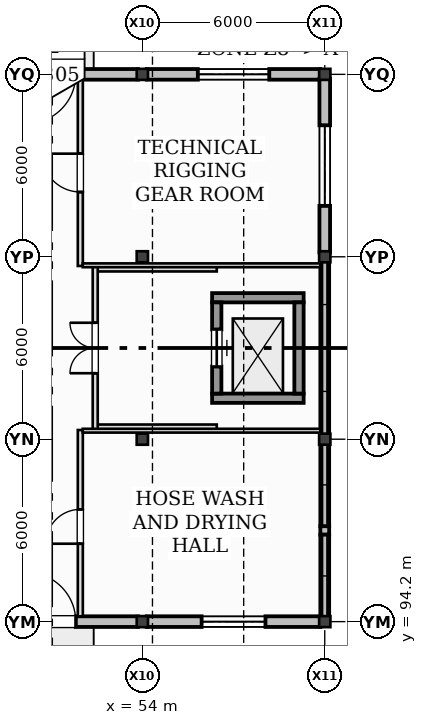
"""IFC4 building model, lengths in metres.
Left out: names, types, materials, properties, quantities, classifications, styles, units other than length and angle.
Written with IfcOpenShell. Run it as: python <this file> out.ifc"""

import sys

from ifc_helpers import new_model, si_unit, direction, frame, frame_2d, origin, origin_2d, place, context, subcontext, project, spatial, rectangle, i_section, extrude, element, fill, save


model = new_model("IFC4")
c1 = context("Model", 3, precision=1e-05, world=origin(), true_north=direction((0.0, 1.0)))
c2 = subcontext(c1, "Body", "Model", "MODEL_VIEW")
j1 = project(units=[si_unit("LENGTHUNIT", "METRE"), si_unit("PLANEANGLEUNIT", "RADIAN")], contexts=[c1])
p1 = place(None, origin())
s1 = spatial("IfcSite", under=j1, at=p1, CompositionType="ELEMENT")
p2 = place(p1, origin())
s2 = spatial("IfcBuilding", under=s1, at=p2, CompositionType="ELEMENT")
p3 = place(p2, origin())
s3 = spatial("IfcBuildingStorey", under=s2, at=p3, CompositionType="ELEMENT", Elevation=0.0)
for number, where, z_axis, x_axis in (
    (1, (54.0, 94.2, -0.41), (0.0, 0.0, 1.0), (1.0, 0.0, 0.0)),
    (2, (54.0, 100.2, -0.41), (0.0, 0.0, 1.0), (1.0, 0.0, 0.0)),
    (3, (54.0, 106.2, -0.41), (0.0, 0.0, 1.0), (1.0, 0.0, 0.0)),
    (4, (54.0, 112.2, -0.41), (0.0, 0.0, 1.0), (1.0, 0.0, 0.0)),
    (5, (60.0, 94.2, -0.41), (0.0, 0.0, 1.0), (1.0, 0.0, 0.0)),
    (6, (60.0, 100.2, -0.41), (0.0, 0.0, 1.0), (1.0, 0.0, 0.0)),
    (7, (60.0, 106.2, -0.41), (0.0, 0.0, 1.0), (1.0, 0.0, 0.0)),
    (8, (60.0, 112.2, -0.41), (0.0, 0.0, 1.0), (1.0, 0.0, 0.0)),
):
    element("IfcColumn", number, at=place(p3, frame(where, z_axis=z_axis, x_axis=x_axis)), inside=s3, PredefinedType="COLUMN", context=c2, shape_type="SweptSolid", body=[
        extrude(i_section(OverallWidth=0.371, OverallDepth=0.364, WebThickness=0.013, FlangeThickness=0.022, at=origin_2d()), origin(), (0.0, 0.0, 1.0), 6.41),
    ])
p4 = place(p3, frame((48.145, 94.2, 0.0), z_axis=(0.0, 0.0, 1.0), x_axis=(1.0, 0.0, 0.0)))
e9 = element("IfcWall", 9, at=p4, inside=s3, PredefinedType="STANDARD", context=c2, shape_type="SweptSolid", body=[
    extrude(rectangle(XDim=5.71, YDim=0.35, at=frame_2d((2.855, 0.0))), origin(), (0.0, 0.0, 1.0), 5.113),
])
p5 = place(p4, frame((2.045, 0.0, 0.0)))
e10 = element("IfcOpeningElement", 10, at=p5, cuts=e9, PredefinedType="OPENING", context=c2, shape_type="SweptSolid", body=[
    extrude(rectangle(XDim=1.62, YDim=2.2, at=frame_2d((0.81, 1.1))), frame((0.0, 0.185, 0.0), z_axis=(0.0, -1.0, 0.0), x_axis=(1.0, 0.0, 0.0)), (0.0, 0.0, 1.0), 0.37),
])
p6 = place(p3, frame((54.145, 94.2, 0.0), z_axis=(0.0, 0.0, 1.0), x_axis=(1.0, 0.0, 0.0)))
e11 = element("IfcWall", 11, at=p6, inside=s3, PredefinedType="STANDARD", context=c2, shape_type="SweptSolid", body=[
    extrude(rectangle(XDim=5.71, YDim=0.35, at=frame_2d((2.855, 0.0))), origin(), (0.0, 0.0, 1.0), 5.113),
])
p7 = place(p6, frame((1.805, 0.0, 1.0)))
e12 = element("IfcOpeningElement", 12, at=p7, cuts=e11, PredefinedType="OPENING", context=c2, shape_type="SweptSolid", body=[
    extrude(rectangle(XDim=2.1, YDim=1.55, at=frame_2d((1.05, 0.775))), frame((0.0, 0.185, 0.0), z_axis=(0.0, -1.0, 0.0), x_axis=(1.0, 0.0, 0.0)), (0.0, 0.0, 1.0), 0.37),
])
p8 = place(p3, frame((53.855, 112.2, 0.0), z_axis=(0.0, 0.0, 1.0), x_axis=(-1.0, 0.0, 0.0)))
e13 = element("IfcWall", 13, at=p8, inside=s3, PredefinedType="STANDARD", context=c2, shape_type="SweptSolid", body=[
    extrude(rectangle(XDim=5.71, YDim=0.35, at=frame_2d((2.855, 0.0))), origin(), (0.0, 0.0, 1.0), 5.113),
])
p9 = place(p8, frame((2.045, 0.0, 0.0)))
e14 = element("IfcOpeningElement", 14, at=p9, cuts=e13, PredefinedType="OPENING", context=c2, shape_type="SweptSolid", body=[
    extrude(rectangle(XDim=1.62, YDim=2.2, at=frame_2d((0.81, 1.1))), frame((0.0, 0.185, 0.0), z_axis=(0.0, -1.0, 0.0), x_axis=(1.0, 0.0, 0.0)), (0.0, 0.0, 1.0), 0.37),
])
p10 = place(p3, frame((59.855, 112.2, 0.0), z_axis=(0.0, 0.0, 1.0), x_axis=(-1.0, 0.0, 0.0)))
e15 = element("IfcWall", 15, at=p10, inside=s3, PredefinedType="STANDARD", context=c2, shape_type="SweptSolid", body=[
    extrude(rectangle(XDim=5.71, YDim=0.35, at=frame_2d((2.855, 0.0))), origin(), (0.0, 0.0, 1.0), 5.113),
])
p11 = place(p10, frame((1.68, 0.0, 1.0)))
e16 = element("IfcOpeningElement", 16, at=p11, cuts=e15, PredefinedType="OPENING", context=c2, shape_type="SweptSolid", body=[
    extrude(rectangle(XDim=2.35, YDim=1.55, at=frame_2d((1.175, 0.775))), frame((0.0, 0.185, 0.0), z_axis=(0.0, -1.0, 0.0), x_axis=(1.0, 0.0, 0.0)), (0.0, 0.0, 1.0), 0.37),
])
p12 = place(p3, frame((60.0, 97.06, 0.0), z_axis=(0.0, 0.0, 1.0), x_axis=(0.0, 1.0, 0.0)))
e17 = element("IfcWall", 17, at=p12, inside=s3, PredefinedType="STANDARD", context=c2, shape_type="SweptSolid", body=[
    extrude(rectangle(XDim=0.28, YDim=0.29, at=frame_2d((0.14, 0.0))), origin(), (0.0, 0.0, 1.0), 5.044),
])
p13 = place(p3, frame((60.0, 94.345, 0.0), z_axis=(0.0, 0.0, 1.0), x_axis=(0.0, 1.0, 0.0)))
e18 = element("IfcWall", 18, at=p13, inside=s3, PredefinedType="STANDARD", context=c2, shape_type="SweptSolid", body=[
    extrude(rectangle(XDim=2.715, YDim=0.29, at=frame_2d((1.357, 0.0))), origin(), (0.0, 0.0, 1.0), 0.44),
])
p14 = place(p3, frame((60.0, 97.34, 0.0), z_axis=(0.0, 0.0, 1.0), x_axis=(0.0, 1.0, 0.0)))
e19 = element("IfcWall", 19, at=p14, inside=s3, PredefinedType="STANDARD", context=c2, shape_type="SweptSolid", body=[
    extrude(rectangle(XDim=2.715, YDim=0.29, at=frame_2d((1.357, 0.0))), origin(), (0.0, 0.0, 1.0), 0.56),
])
p15 = place(p3, frame((60.0, 100.345, 0.0), z_axis=(0.0, 0.0, 1.0), x_axis=(0.0, 1.0, 0.0)))
e20 = element("IfcWall", 20, at=p15, inside=s3, PredefinedType="STANDARD", context=c2, shape_type="SweptSolid", body=[
    extrude(rectangle(XDim=5.71, YDim=0.29, at=frame_2d((2.855, 0.0))), origin(), (0.0, 0.0, 1.0), 0.68),
])
p16 = place(p3, frame((60.0, 106.345, 0.0), z_axis=(0.0, 0.0, 1.0), x_axis=(0.0, 1.0, 0.0)))
e21 = element("IfcWall", 21, at=p16, inside=s3, PredefinedType="STANDARD", context=c2, shape_type="SweptSolid", body=[
    extrude(rectangle(XDim=5.71, YDim=0.35, at=frame_2d((2.855, 0.0))), origin(), (0.0, 0.0, 1.0), 5.044),
])
p17 = place(p16, frame((1.53, 0.0, 1.0)))
e22 = element("IfcOpeningElement", 22, at=p17, cuts=e21, PredefinedType="OPENING", context=c2, shape_type="SweptSolid", body=[
    extrude(rectangle(XDim=2.65, YDim=1.55, at=frame_2d((1.325, 0.775))), frame((0.0, 0.185, 0.0), z_axis=(0.0, -1.0, 0.0), x_axis=(1.0, 0.0, 0.0)), (0.0, 0.0, 1.0), 0.37),
])
for number, where, z_axis, x_axis in (
    (23, (56.295, 101.548, 0.0), (0.0, 0.0, 1.0), (1.0, 0.0, 0.0)),
    (24, (59.305, 104.853, 0.0), (0.0, 0.0, 1.0), (-1.0, 0.0, 0.0)),
):
    element("IfcWall", number, at=place(p3, frame(where, z_axis=z_axis, x_axis=x_axis)), inside=s3, PredefinedType="SHEAR", context=c2, shape_type="SweptSolid", body=[
        extrude(rectangle(XDim=3.01, YDim=0.305, at=frame_2d((1.505, 0.0))), origin(), (0.0, 0.0, 1.0), 6.0),
    ])
p18 = place(p3, frame((56.448, 104.7, 0.0), z_axis=(0.0, 0.0, 1.0), x_axis=(0.0, -1.0, 0.0)))
e25 = element("IfcWall", 25, at=p18, inside=s3, PredefinedType="SHEAR", context=c2, shape_type="SweptSolid", body=[
    extrude(rectangle(XDim=3.0, YDim=0.305, at=frame_2d((1.5, 0.0))), origin(), (0.0, 0.0, 1.0), 6.0),
])
p19 = place(p18, frame((0.89, 0.0, 0.0)))
e26 = element("IfcOpeningElement", 26, at=p19, cuts=e25, PredefinedType="OPENING", context=c2, shape_type="SweptSolid", body=[
    extrude(rectangle(XDim=1.22, YDim=2.22, at=frame_2d((0.61, 1.11))), frame((0.0, 0.162, 0.0), z_axis=(0.0, -1.0, 0.0), x_axis=(1.0, 0.0, 0.0)), (0.0, 0.0, 1.0), 0.325),
])
p20 = place(p3, frame((59.153, 101.7, 0.0), z_axis=(0.0, 0.0, 1.0), x_axis=(0.0, 1.0, 0.0)))
e27 = element("IfcWall", 27, at=p20, inside=s3, PredefinedType="SHEAR", context=c2, shape_type="SweptSolid", body=[
    extrude(rectangle(XDim=3.0, YDim=0.305, at=frame_2d((1.5, 0.0))), origin(), (0.0, 0.0, 1.0), 6.0),
])
for number, where, z_axis, x_axis in (
    (28, (52.45, 100.6, 0.0), (0.0, 0.0, 1.0), (1.0, 0.0, 0.0)),
    (29, (56.448, 105.8, 0.0), (0.0, 0.0, 1.0), (-1.0, 0.0, 0.0)),
):
    element("IfcWall", number, at=place(p3, frame(where, z_axis=z_axis, x_axis=x_axis)), inside=s3, PredefinedType="PARTITIONING", context=c2, shape_type="SweptSolid", body=[
        extrude(rectangle(XDim=3.998, YDim=0.165, at=frame_2d((1.999, 0.0))), origin(), (0.0, 0.0, 1.0), 5.68),
    ])
p21 = place(p3, frame((52.45, 100.52, 0.0), z_axis=(0.0, 0.0, 1.0), x_axis=(0.0, 1.0, 0.0)))
e30 = element("IfcWall", 30, at=p21, inside=s3, PredefinedType="PARTITIONING", context=c2, shape_type="SweptSolid", body=[
    extrude(rectangle(XDim=5.36, YDim=0.165, at=frame_2d((2.68, 0.0))), origin(), (0.0, 0.0, 1.0), 5.68),
])
p22 = place(p21, frame((1.85, 0.0, 0.0)))
e31 = element("IfcOpeningElement", 31, at=p22, cuts=e30, PredefinedType="OPENING", context=c2, shape_type="SweptSolid", body=[
    extrude(rectangle(XDim=1.66, YDim=2.2, at=frame_2d((0.83, 1.1))), frame((0.0, 0.093, 0.0), z_axis=(0.0, -1.0, 0.0), x_axis=(1.0, 0.0, 0.0)), (0.0, 0.0, 1.0), 0.185),
])
p23 = place(p3, frame((51.96, 94.375, 0.0), z_axis=(0.0, 0.0, 1.0), x_axis=(0.0, 1.0, 0.0)))
e32 = element("IfcWall", 32, at=p23, inside=s3, PredefinedType="PARTITIONING", context=c2, shape_type="SweptSolid", body=[
    extrude(rectangle(XDim=6.127, YDim=0.165, at=frame_2d((3.064, 0.0))), origin(), (0.0, 0.0, 1.0), 5.249),
])
p24 = place(p23, frame((2.387, 0.0, 0.0)))
e33 = element("IfcOpeningElement", 33, at=p24, cuts=e32, PredefinedType="OPENING", context=c2, shape_type="SweptSolid", body=[
    extrude(rectangle(XDim=1.13, YDim=2.18, at=frame_2d((0.565, 1.09))), frame((0.0, 0.093, 0.0), z_axis=(0.0, -1.0, 0.0), x_axis=(1.0, 0.0, 0.0)), (0.0, 0.0, 1.0), 0.185),
])
p25 = place(p3, frame((52.04, 100.48, 0.0), z_axis=(0.0, 0.0, 1.0), x_axis=(1.0, 0.0, 0.0)))
e34 = element("IfcWall", 34, at=p25, inside=s3, PredefinedType="PARTITIONING", context=c2, shape_type="SweptSolid", body=[
    extrude(rectangle(XDim=7.815, YDim=0.125, at=frame_2d((3.907, 0.0))), origin(), (0.0, 0.0, 1.0), 5.113),
])
p26 = place(p3, frame((51.96, 105.897, 0.0), z_axis=(0.0, 0.0, 1.0), x_axis=(0.0, 1.0, 0.0)))
e35 = element("IfcWall", 35, at=p26, inside=s3, PredefinedType="PARTITIONING", context=c2, shape_type="SweptSolid", body=[
    extrude(rectangle(XDim=6.127, YDim=0.165, at=frame_2d((3.064, 0.0))), origin(), (0.0, 0.0, 1.0), 5.249),
])
p27 = place(p26, frame((2.434, 0.0, 0.0)))
e36 = element("IfcOpeningElement", 36, at=p27, cuts=e35, PredefinedType="OPENING", context=c2, shape_type="SweptSolid", body=[
    extrude(rectangle(XDim=1.26, YDim=2.2, at=frame_2d((0.63, 1.1))), frame((0.0, 0.093, 0.0), z_axis=(0.0, -1.0, 0.0), x_axis=(1.0, 0.0, 0.0)), (0.0, 0.0, 1.0), 0.185),
])
p28 = place(p3, frame((59.855, 105.92, 0.0), z_axis=(0.0, 0.0, 1.0), x_axis=(-1.0, 0.0, 0.0)))
e37 = element("IfcWall", 37, at=p28, inside=s3, PredefinedType="PARTITIONING", context=c2, shape_type="SweptSolid", body=[
    extrude(rectangle(XDim=7.815, YDim=0.125, at=frame_2d((3.907, 0.0))), origin(), (0.0, 0.0, 1.0), 5.113),
])
p29 = place(p5, frame((1.62, 0.0, 0.0), z_axis=(0.0, 0.0, 1.0), x_axis=(-1.0, 0.0, 0.0)))
e38 = element("IfcDoor", 38, at=p29, inside=s3, OperationType="SINGLE_SWING_LEFT", PredefinedType="DOOR", context=c2, shape_type="SweptSolid", body=[
    extrude(rectangle(XDim=1.62, YDim=2.2, at=frame_2d((0.81, 1.1))), frame((0.0, 0.025, 0.0), z_axis=(0.0, -1.0, 0.0), x_axis=(1.0, 0.0, 0.0)), (0.0, 0.0, 1.0), 0.05),
])
fill(e10, e38)
p30 = place(p7, origin())
e39 = element("IfcWindow", 39, at=p30, inside=s3, PartitioningType="SINGLE_PANEL", PredefinedType="WINDOW", context=c2, shape_type="SweptSolid", body=[
    extrude(rectangle(XDim=2.1, YDim=1.55, at=frame_2d((1.05, 0.775))), frame((0.0, 0.03, 0.0), z_axis=(0.0, -1.0, 0.0), x_axis=(1.0, 0.0, 0.0)), (0.0, 0.0, 1.0), 0.06),
])
fill(e12, e39)
p31 = place(p9, frame((1.62, 0.0, 0.0), z_axis=(0.0, 0.0, 1.0), x_axis=(-1.0, 0.0, 0.0)))
e40 = element("IfcDoor", 40, at=p31, inside=s3, OperationType="SINGLE_SWING_RIGHT", PredefinedType="DOOR", context=c2, shape_type="SweptSolid", body=[
    extrude(rectangle(XDim=1.62, YDim=2.2, at=frame_2d((0.81, 1.1))), frame((0.0, 0.025, 0.0), z_axis=(0.0, -1.0, 0.0), x_axis=(1.0, 0.0, 0.0)), (0.0, 0.0, 1.0), 0.05),
])
fill(e14, e40)
p32 = place(p11, origin())
e41 = element("IfcWindow", 41, at=p32, inside=s3, PartitioningType="SINGLE_PANEL", PredefinedType="WINDOW", context=c2, shape_type="SweptSolid", body=[
    extrude(rectangle(XDim=2.35, YDim=1.55, at=frame_2d((1.175, 0.775))), frame((0.0, 0.03, 0.0), z_axis=(0.0, -1.0, 0.0), x_axis=(1.0, 0.0, 0.0)), (0.0, 0.0, 1.0), 0.06),
])
fill(e16, e41)
p33 = place(p17, origin())
e42 = element("IfcWindow", 42, at=p33, inside=s3, PartitioningType="SINGLE_PANEL", PredefinedType="WINDOW", context=c2, shape_type="SweptSolid", body=[
    extrude(rectangle(XDim=2.65, YDim=1.55, at=frame_2d((1.325, 0.775))), frame((0.0, 0.03, 0.0), z_axis=(0.0, -1.0, 0.0), x_axis=(1.0, 0.0, 0.0)), (0.0, 0.0, 1.0), 0.06),
])
fill(e22, e42)
p34 = place(p19, origin())
e43 = element("IfcDoor", 43, at=p34, inside=s3, OperationType="SLIDING_TO_LEFT", PredefinedType="DOOR", context=c2, shape_type="SweptSolid", body=[
    extrude(rectangle(XDim=1.22, YDim=2.22, at=frame_2d((0.61, 1.11))), frame((0.0, 0.025, 0.0), z_axis=(0.0, -1.0, 0.0), x_axis=(1.0, 0.0, 0.0)), (0.0, 0.0, 1.0), 0.05),
])
fill(e26, e43)
p35 = place(p22, frame((1.66, 0.0, 0.0), z_axis=(0.0, 0.0, 1.0), x_axis=(-1.0, 0.0, 0.0)))
e44 = element("IfcDoor", 44, at=p35, inside=s3, OperationType="DOUBLE_DOOR_SINGLE_SWING", PredefinedType="DOOR", context=c2, shape_type="SweptSolid", body=[
    extrude(rectangle(XDim=1.66, YDim=2.2, at=frame_2d((0.83, 1.1))), frame((0.0, 0.025, 0.0), z_axis=(0.0, -1.0, 0.0), x_axis=(1.0, 0.0, 0.0)), (0.0, 0.0, 1.0), 0.05),
])
fill(e31, e44)
p36 = place(p24, frame((1.13, 0.0, 0.0), z_axis=(0.0, 0.0, 1.0), x_axis=(-1.0, 0.0, 0.0)))
e45 = element("IfcDoor", 45, at=p36, inside=s3, OperationType="SINGLE_SWING_LEFT", PredefinedType="DOOR", context=c2, shape_type="SweptSolid", body=[
    extrude(rectangle(XDim=1.13, YDim=2.18, at=frame_2d((0.565, 1.09))), frame((0.0, 0.025, 0.0), z_axis=(0.0, -1.0, 0.0), x_axis=(1.0, 0.0, 0.0)), (0.0, 0.0, 1.0), 0.05),
])
fill(e33, e45)
p37 = place(p27, frame((1.26, 0.0, 0.0), z_axis=(0.0, 0.0, 1.0), x_axis=(-1.0, 0.0, 0.0)))
e46 = element("IfcDoor", 46, at=p37, inside=s3, OperationType="SINGLE_SWING_RIGHT", PredefinedType="DOOR", context=c2, shape_type="SweptSolid", body=[
    extrude(rectangle(XDim=1.26, YDim=2.2, at=frame_2d((0.63, 1.1))), frame((0.0, 0.025, 0.0), z_axis=(0.0, -1.0, 0.0), x_axis=(1.0, 0.0, 0.0)), (0.0, 0.0, 1.0), 0.05),
])
fill(e36, e46)
save(model, sys.argv[1])
